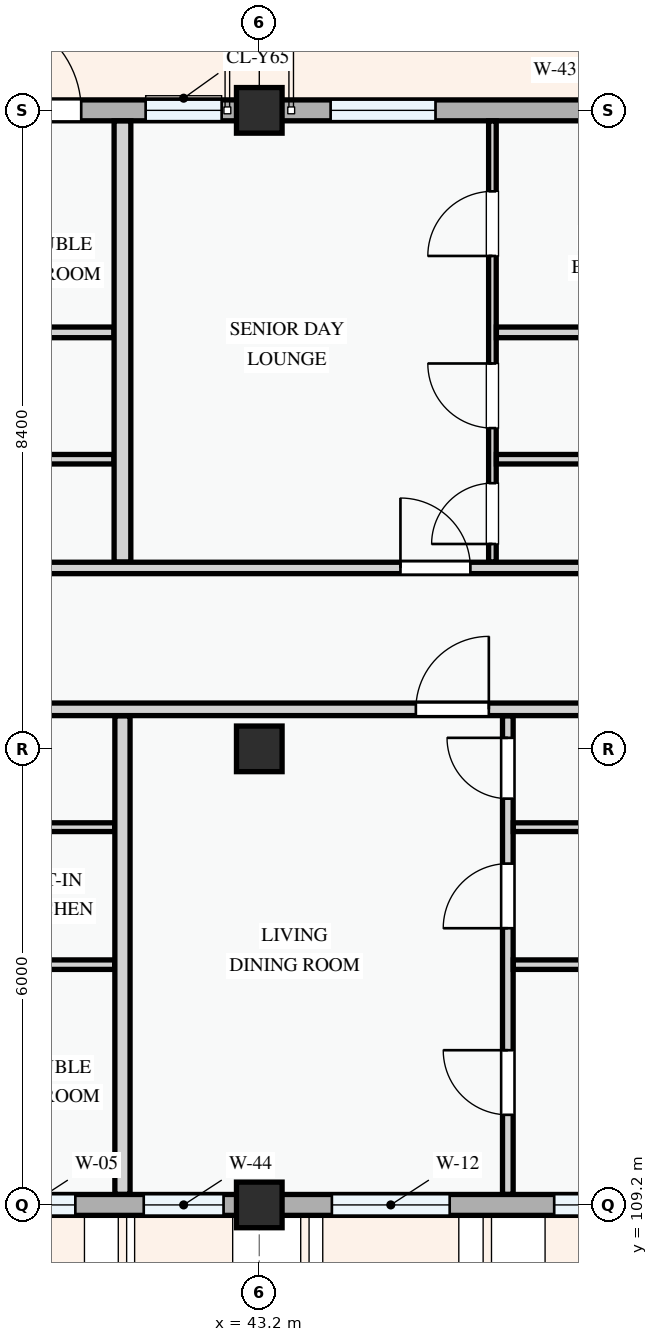
"""IFC4 building model, lengths in metres.
Left out: names, types, materials, properties, quantities, classifications, styles, units other than length and angle.
Written with IfcOpenShell. Run it as: python <this file> out.ifc"""

import sys

from ifc_helpers import new_model, si_unit, direction, frame, frame_2d, origin, origin_2d, place, context, subcontext, project, spatial, rectangle, extrude, element, fill, save


model = new_model("IFC4")
c1 = context("Model", 3, precision=1e-05, world=origin(), true_north=direction((0.0, 1.0)))
c2 = subcontext(c1, "Body", "Model", "MODEL_VIEW")
j1 = project(units=[si_unit("LENGTHUNIT", "METRE"), si_unit("PLANEANGLEUNIT", "RADIAN")], contexts=[c1])
p1 = place(None, origin())
s1 = spatial("IfcSite", under=j1, at=p1, CompositionType="ELEMENT")
p2 = place(p1, origin())
s2 = spatial("IfcBuilding", under=s1, at=p2, CompositionType="ELEMENT")
p3 = place(p2, frame((0.0, 0.0, 31.2)))
s3 = spatial("IfcBuildingStorey", under=s2, at=p3, CompositionType="ELEMENT", Elevation=31.2)
for number, where, z_axis, x_axis in (
    (1, (43.2, 109.2, 0.0), (0.0, 0.0, 1.0), (1.0, 0.0, 0.0)),
    (2, (43.2, 115.2, 0.0), (0.0, 0.0, 1.0), (1.0, 0.0, 0.0)),
    (3, (43.2, 123.6, 0.0), (0.0, 0.0, 1.0), (1.0, 0.0, 0.0)),
):
    element("IfcColumn", number, at=place(p3, frame(where, z_axis=z_axis, x_axis=x_axis)), inside=s3, PredefinedType="COLUMN", context=c2, shape_type="SweptSolid", body=[
        extrude(rectangle(XDim=0.6, YDim=0.6, at=origin_2d()), origin(), (0.0, 0.0, 1.0), 3.3),
    ])
p4 = place(p3, frame((37.2, 109.2, 0.0), z_axis=(0.0, 0.0, 1.0), x_axis=(1.0, 0.0, 0.0)))
e4 = element("IfcWall", 4, at=p4, inside=s3, PredefinedType="STANDARD", context=c2, shape_type="SweptSolid", body=[
    extrude(rectangle(XDim=6.0, YDim=0.275, at=frame_2d((3.0, 0.0))), origin(), (0.0, 0.0, 1.0), 2.525),
])
p5 = place(p4, frame((0.525, 0.0, 0.78)))
e5 = element("IfcOpeningElement", 5, at=p5, cuts=e4, PredefinedType="OPENING", context=c2, shape_type="SweptSolid", body=[
    extrude(rectangle(XDim=0.9, YDim=1.2, at=frame_2d((0.45, 0.6))), frame((0.0, 0.147, 0.0), z_axis=(0.0, -1.0, 0.0), x_axis=(1.0, 0.0, 0.0)), (0.0, 0.0, 1.0), 0.295),
])
p6 = place(p4, frame((2.38, 0.0, 0.78)))
e6 = element("IfcOpeningElement", 6, at=p6, cuts=e4, PredefinedType="OPENING", context=c2, shape_type="SweptSolid", body=[
    extrude(rectangle(XDim=1.2, YDim=1.5, at=frame_2d((0.6, 0.75))), frame((0.0, 0.147, 0.0), z_axis=(0.0, -1.0, 0.0), x_axis=(1.0, 0.0, 0.0)), (0.0, 0.0, 1.0), 0.295),
])
p7 = place(p4, frame((4.48, 0.0, 0.78)))
e7 = element("IfcOpeningElement", 7, at=p7, cuts=e4, PredefinedType="OPENING", context=c2, shape_type="SweptSolid", body=[
    extrude(rectangle(XDim=1.05, YDim=1.2, at=frame_2d((0.525, 0.6))), frame((0.0, 0.147, 0.0), z_axis=(0.0, -1.0, 0.0), x_axis=(1.0, 0.0, 0.0)), (0.0, 0.0, 1.0), 0.295),
])
p8 = place(p3, frame((43.2, 109.2, 0.0), z_axis=(0.0, 0.0, 1.0), x_axis=(1.0, 0.0, 0.0)))
e8 = element("IfcWall", 8, at=p8, inside=s3, PredefinedType="STANDARD", context=c2, shape_type="SweptSolid", body=[
    extrude(rectangle(XDim=8.4, YDim=0.275, at=frame_2d((4.2, 0.0))), origin(), (0.0, 0.0, 1.0), 2.375),
])
p9 = place(p8, frame((0.955, 0.0, 0.78)))
e9 = element("IfcOpeningElement", 9, at=p9, cuts=e8, PredefinedType="OPENING", context=c2, shape_type="SweptSolid", body=[
    extrude(rectangle(XDim=1.55, YDim=1.4, at=frame_2d((0.775, 0.7))), frame((0.0, 0.147, 0.0), z_axis=(0.0, -1.0, 0.0), x_axis=(1.0, 0.0, 0.0)), (0.0, 0.0, 1.0), 0.295),
])
p10 = place(p8, frame((3.88, 0.0, 0.78)))
e10 = element("IfcOpeningElement", 10, at=p10, cuts=e8, PredefinedType="OPENING", context=c2, shape_type="SweptSolid", body=[
    extrude(rectangle(XDim=1.32, YDim=1.35, at=frame_2d((0.66, 0.675))), frame((0.0, 0.147, 0.0), z_axis=(0.0, -1.0, 0.0), x_axis=(1.0, 0.0, 0.0)), (0.0, 0.0, 1.0), 0.295),
])
p11 = place(p8, frame((6.05, 0.0, 0.78)))
e11 = element("IfcOpeningElement", 11, at=p11, cuts=e8, PredefinedType="OPENING", context=c2, shape_type="SweptSolid", body=[
    extrude(rectangle(XDim=1.78, YDim=1.42, at=frame_2d((0.89, 0.71))), frame((0.0, 0.147, 0.0), z_axis=(0.0, -1.0, 0.0), x_axis=(1.0, 0.0, 0.0)), (0.0, 0.0, 1.0), 0.295),
])
p12 = place(p3, frame((51.6, 123.6, 0.0), z_axis=(0.0, 0.0, 1.0), x_axis=(-1.0, 0.0, 0.0)))
e12 = element("IfcWall", 12, at=p12, inside=s3, PredefinedType="STANDARD", context=c2, shape_type="SweptSolid", body=[
    extrude(rectangle(XDim=8.4, YDim=0.275, at=frame_2d((4.2, 0.0))), origin(), (0.0, 0.0, 1.0), 2.375),
])
p13 = place(p12, frame((0.62, 0.0, 0.0)))
e13 = element("IfcOpeningElement", 13, at=p13, cuts=e12, PredefinedType="OPENING", context=c2, shape_type="SweptSolid", body=[
    extrude(rectangle(XDim=1.25, YDim=2.2, at=frame_2d((0.625, 1.1))), frame((0.0, 0.147, 0.0), z_axis=(0.0, -1.0, 0.0), x_axis=(1.0, 0.0, 0.0)), (0.0, 0.0, 1.0), 0.295),
])
p14 = place(p12, frame((3.151, 0.0, 0.78)))
e14 = element("IfcOpeningElement", 14, at=p14, cuts=e12, PredefinedType="OPENING", context=c2, shape_type="SweptSolid", body=[
    extrude(rectangle(XDim=0.95, YDim=1.15, at=frame_2d((0.475, 0.575))), frame((0.0, 0.147, 0.0), z_axis=(0.0, -1.0, 0.0), x_axis=(1.0, 0.0, 0.0)), (0.0, 0.0, 1.0), 0.295),
])
p15 = place(p12, frame((6.081, 0.0, 0.78)))
e15 = element("IfcOpeningElement", 15, at=p15, cuts=e12, PredefinedType="OPENING", context=c2, shape_type="SweptSolid", body=[
    extrude(rectangle(XDim=1.38, YDim=1.48, at=frame_2d((0.69, 0.74))), frame((0.0, 0.147, 0.0), z_axis=(0.0, -1.0, 0.0), x_axis=(1.0, 0.0, 0.0)), (0.0, 0.0, 1.0), 0.295),
])
p16 = place(p3, frame((43.2, 123.6, 0.0), z_axis=(0.0, 0.0, 1.0), x_axis=(-1.0, 0.0, 0.0)))
e16 = element("IfcWall", 16, at=p16, inside=s3, PredefinedType="STANDARD", context=c2, shape_type="SweptSolid", body=[
    extrude(rectangle(XDim=6.0, YDim=0.275, at=frame_2d((3.0, 0.0))), origin(), (0.0, 0.0, 1.0), 2.525),
])
p17 = place(p16, frame((2.343, 0.0, 0.0)))
e17 = element("IfcOpeningElement", 17, at=p17, cuts=e16, PredefinedType="OPENING", context=c2, shape_type="SweptSolid", body=[
    extrude(rectangle(XDim=1.3, YDim=2.15, at=frame_2d((0.65, 1.075))), frame((0.0, 0.147, 0.0), z_axis=(0.0, -1.0, 0.0), x_axis=(1.0, 0.0, 0.0)), (0.0, 0.0, 1.0), 0.295),
])
p18 = place(p16, frame((0.495, 0.0, 0.78)))
e18 = element("IfcOpeningElement", 18, at=p18, cuts=e16, PredefinedType="OPENING", context=c2, shape_type="SweptSolid", body=[
    extrude(rectangle(XDim=1.0, YDim=1.25, at=frame_2d((0.5, 0.625))), frame((0.0, 0.147, 0.0), z_axis=(0.0, -1.0, 0.0), x_axis=(1.0, 0.0, 0.0)), (0.0, 0.0, 1.0), 0.295),
])
p19 = place(p16, frame((4.473, 0.0, 0.78)))
e19 = element("IfcOpeningElement", 19, at=p19, cuts=e16, PredefinedType="OPENING", context=c2, shape_type="SweptSolid", body=[
    extrude(rectangle(XDim=1.05, YDim=1.2, at=frame_2d((0.525, 0.6))), frame((0.0, 0.147, 0.0), z_axis=(0.0, -1.0, 0.0), x_axis=(1.0, 0.0, 0.0)), (0.0, 0.0, 1.0), 0.295),
])
p20 = place(p3, frame((39.032, 112.361, 0.0), z_axis=(0.0, 0.0, 1.0), x_axis=(1.0, 0.0, 0.0)))
e20 = element("IfcWall", 20, at=p20, inside=s3, PredefinedType="PARTITIONING", context=c2, shape_type="SweptSolid", body=[
    extrude(rectangle(XDim=2.266, YDim=0.125, at=frame_2d((1.133, 0.0))), origin(), (0.0, 0.0, 1.0), 3.0),
])
p21 = place(p3, frame((39.032, 114.17, 0.0), z_axis=(0.0, 0.0, 1.0), x_axis=(1.0, 0.0, 0.0)))
e21 = element("IfcWall", 21, at=p21, inside=s3, PredefinedType="PARTITIONING", context=c2, shape_type="SweptSolid", body=[
    extrude(rectangle(XDim=2.266, YDim=0.115, at=frame_2d((1.133, 0.0))), origin(), (0.0, 0.0, 1.0), 3.0),
])
p22 = place(p3, frame((39.066, 120.679, 0.0), z_axis=(0.0, 0.0, 1.0), x_axis=(1.0, 0.0, 0.0)))
e22 = element("IfcWall", 22, at=p22, inside=s3, PredefinedType="PARTITIONING", context=c2, shape_type="SweptSolid", body=[
    extrude(rectangle(XDim=2.222, YDim=0.14, at=frame_2d((1.111, 0.0))), origin(), (0.0, 0.0, 1.0), 3.0),
])
p23 = place(p3, frame((39.066, 119.01, 0.0), z_axis=(0.0, 0.0, 1.0), x_axis=(1.0, 0.0, 0.0)))
e23 = element("IfcWall", 23, at=p23, inside=s3, PredefinedType="PARTITIONING", context=c2, shape_type="SweptSolid", body=[
    extrude(rectangle(XDim=2.222, YDim=0.125, at=frame_2d((1.111, 0.0))), origin(), (0.0, 0.0, 1.0), 3.0),
])
p24 = place(p3, frame((46.47, 109.34, 0.0), z_axis=(0.0, 0.0, 1.0), x_axis=(0.0, 1.0, 0.0)))
e24 = element("IfcWall", 24, at=p24, inside=s3, PredefinedType="PARTITIONING", context=c2, shape_type="SweptSolid", body=[
    extrude(rectangle(XDim=6.296, YDim=0.14, at=frame_2d((3.148, 0.0))), origin(), (0.0, 0.0, 1.0), 3.0),
])
p25 = place(p24, frame((1.046, 0.0, 0.0)))
e25 = element("IfcOpeningElement", 25, at=p25, cuts=e24, PredefinedType="OPENING", context=c2, shape_type="SweptSolid", body=[
    extrude(rectangle(XDim=0.85, YDim=2.1, at=frame_2d((0.425, 1.05))), frame((0.0, 0.08, 0.0), z_axis=(0.0, -1.0, 0.0), x_axis=(1.0, 0.0, 0.0)), (0.0, 0.0, 1.0), 0.16),
])
p26 = place(p24, frame((3.501, 0.0, 0.0)))
e26 = element("IfcOpeningElement", 26, at=p26, cuts=e24, PredefinedType="OPENING", context=c2, shape_type="SweptSolid", body=[
    extrude(rectangle(XDim=0.85, YDim=2.1, at=frame_2d((0.425, 1.05))), frame((0.0, 0.08, 0.0), z_axis=(0.0, -1.0, 0.0), x_axis=(1.0, 0.0, 0.0)), (0.0, 0.0, 1.0), 0.16),
])
p27 = place(p24, frame((5.205, 0.0, 0.0)))
e27 = element("IfcOpeningElement", 27, at=p27, cuts=e24, PredefinedType="OPENING", context=c2, shape_type="SweptSolid", body=[
    extrude(rectangle(XDim=0.8, YDim=2.1, at=frame_2d((0.4, 1.05))), frame((0.0, 0.08, 0.0), z_axis=(0.0, -1.0, 0.0), x_axis=(1.0, 0.0, 0.0)), (0.0, 0.0, 1.0), 0.16),
])
p28 = place(p3, frame((46.542, 112.361, 0.0), z_axis=(0.0, 0.0, 1.0), x_axis=(1.0, 0.0, 0.0)))
e28 = element("IfcWall", 28, at=p28, inside=s3, PredefinedType="PARTITIONING", context=c2, shape_type="SweptSolid", body=[
    extrude(rectangle(XDim=4.918, YDim=0.125, at=frame_2d((2.459, 0.0))), origin(), (0.0, 0.0, 1.0), 3.0),
])
p29 = place(p3, frame((46.542, 114.17, 0.0), z_axis=(0.0, 0.0, 1.0), x_axis=(1.0, 0.0, 0.0)))
e29 = element("IfcWall", 29, at=p29, inside=s3, PredefinedType="PARTITIONING", context=c2, shape_type="SweptSolid", body=[
    extrude(rectangle(XDim=4.918, YDim=0.115, at=frame_2d((2.459, 0.0))), origin(), (0.0, 0.0, 1.0), 3.0),
])
p30 = place(p3, frame((46.267, 117.657, 0.0), z_axis=(0.0, 0.0, 1.0), x_axis=(0.0, 1.0, 0.0)))
e30 = element("IfcWall", 30, at=p30, inside=s3, PredefinedType="PARTITIONING", context=c2, shape_type="SweptSolid", body=[
    extrude(rectangle(XDim=5.803, YDim=0.1, at=frame_2d((2.902, 0.0))), origin(), (0.0, 0.0, 1.0), 3.0),
])
p31 = place(p30, frame((0.238, 0.0, 0.0)))
e31 = element("IfcOpeningElement", 31, at=p31, cuts=e30, PredefinedType="OPENING", context=c2, shape_type="SweptSolid", body=[
    extrude(rectangle(XDim=0.8, YDim=2.1, at=frame_2d((0.4, 1.05))), frame((0.0, 0.06, 0.0), z_axis=(0.0, -1.0, 0.0), x_axis=(1.0, 0.0, 0.0)), (0.0, 0.0, 1.0), 0.12),
])
p32 = place(p30, frame((1.763, 0.0, 0.0)))
e32 = element("IfcOpeningElement", 32, at=p32, cuts=e30, PredefinedType="OPENING", context=c2, shape_type="SweptSolid", body=[
    extrude(rectangle(XDim=0.85, YDim=2.1, at=frame_2d((0.425, 1.05))), frame((0.0, 0.06, 0.0), z_axis=(0.0, -1.0, 0.0), x_axis=(1.0, 0.0, 0.0)), (0.0, 0.0, 1.0), 0.12),
])
p33 = place(p30, frame((4.028, 0.0, 0.0)))
e33 = element("IfcOpeningElement", 33, at=p33, cuts=e30, PredefinedType="OPENING", context=c2, shape_type="SweptSolid", body=[
    extrude(rectangle(XDim=0.85, YDim=2.1, at=frame_2d((0.425, 1.05))), frame((0.0, 0.06, 0.0), z_axis=(0.0, -1.0, 0.0), x_axis=(1.0, 0.0, 0.0)), (0.0, 0.0, 1.0), 0.12),
])
p34 = place(p3, frame((46.319, 120.679, 0.0), z_axis=(0.0, 0.0, 1.0), x_axis=(1.0, 0.0, 0.0)))
e34 = element("IfcWall", 34, at=p34, inside=s3, PredefinedType="PARTITIONING", context=c2, shape_type="SweptSolid", body=[
    extrude(rectangle(XDim=5.221, YDim=0.14, at=frame_2d((2.61, 0.0))), origin(), (0.0, 0.0, 1.0), 3.0),
])
p35 = place(p3, frame((46.319, 119.01, 0.0), z_axis=(0.0, 0.0, 1.0), x_axis=(1.0, 0.0, 0.0)))
e35 = element("IfcWall", 35, at=p35, inside=s3, PredefinedType="PARTITIONING", context=c2, shape_type="SweptSolid", body=[
    extrude(rectangle(XDim=5.221, YDim=0.125, at=frame_2d((2.61, 0.0))), origin(), (0.0, 0.0, 1.0), 3.0),
])
p36 = place(p3, frame((41.4, 109.34, 0.0), z_axis=(0.0, 0.0, 1.0), x_axis=(0.0, 1.0, 0.0)))
e36 = element("IfcWall", 36, at=p36, inside=s3, PredefinedType="PARTITIONING", context=c2, shape_type="SweptSolid", body=[
    extrude(rectangle(XDim=6.296, YDim=0.2, at=frame_2d((3.148, 0.0))), origin(), (0.0, 0.0, 1.0), 3.0),
])
p37 = place(p3, frame((41.4, 117.657, 0.0), z_axis=(0.0, 0.0, 1.0), x_axis=(0.0, 1.0, 0.0)))
e37 = element("IfcWall", 37, at=p37, inside=s3, PredefinedType="PARTITIONING", context=c2, shape_type="SweptSolid", body=[
    extrude(rectangle(XDim=5.803, YDim=0.22, at=frame_2d((2.902, 0.0))), origin(), (0.0, 0.0, 1.0), 3.0),
])
p38 = place(p3, frame((25.15, 115.72, 0.0), z_axis=(0.0, 0.0, 1.0), x_axis=(1.0, 0.0, 0.0)))
e38 = element("IfcWall", 38, at=p38, inside=s3, PredefinedType="PARTITIONING", context=c2, shape_type="SweptSolid", body=[
    extrude(rectangle(XDim=26.311, YDim=0.165, at=frame_2d((13.155, 0.0))), origin(), (0.0, 0.0, 1.0), 3.0),
])
p39 = place(p38, frame((0.25, 0.0, 0.0)))
e39 = element("IfcOpeningElement", 39, at=p39, cuts=e38, PredefinedType="OPENING", context=c2, shape_type="SweptSolid", body=[
    extrude(rectangle(XDim=0.92, YDim=2.1, at=frame_2d((0.46, 1.05))), frame((0.0, 0.093, 0.0), z_axis=(0.0, -1.0, 0.0), x_axis=(1.0, 0.0, 0.0)), (0.0, 0.0, 1.0), 0.185),
])
p40 = place(p38, frame((9.22, 0.0, 0.0)))
e40 = element("IfcOpeningElement", 40, at=p40, cuts=e38, PredefinedType="OPENING", context=c2, shape_type="SweptSolid", body=[
    extrude(rectangle(XDim=0.92, YDim=2.1, at=frame_2d((0.46, 1.05))), frame((0.0, 0.093, 0.0), z_axis=(0.0, -1.0, 0.0), x_axis=(1.0, 0.0, 0.0)), (0.0, 0.0, 1.0), 0.185),
])
p41 = place(p38, frame((20.11, 0.0, 0.0)))
e41 = element("IfcOpeningElement", 41, at=p41, cuts=e38, PredefinedType="OPENING", context=c2, shape_type="SweptSolid", body=[
    extrude(rectangle(XDim=0.96, YDim=2.12, at=frame_2d((0.48, 1.06))), frame((0.0, 0.093, 0.0), z_axis=(0.0, -1.0, 0.0), x_axis=(1.0, 0.0, 0.0)), (0.0, 0.0, 1.0), 0.185),
])
p42 = place(p3, frame((22.66, 117.58, 0.0), z_axis=(0.0, 0.0, 1.0), x_axis=(1.0, 0.0, 0.0)))
e42 = element("IfcWall", 42, at=p42, inside=s3, PredefinedType="PARTITIONING", context=c2, shape_type="SweptSolid", body=[
    extrude(rectangle(XDim=28.88, YDim=0.15, at=frame_2d((14.44, 0.0))), origin(), (0.0, 0.0, 1.0), 3.0),
])
p43 = place(p42, frame((2.74, 0.0, 0.0)))
e43 = element("IfcOpeningElement", 43, at=p43, cuts=e42, PredefinedType="OPENING", context=c2, shape_type="SweptSolid", body=[
    extrude(rectangle(XDim=0.92, YDim=2.1, at=frame_2d((0.46, 1.05))), frame((0.0, 0.085, 0.0), z_axis=(0.0, -1.0, 0.0), x_axis=(1.0, 0.0, 0.0)), (0.0, 0.0, 1.0), 0.17),
])
p44 = place(p42, frame((11.71, 0.0, 0.0)))
e44 = element("IfcOpeningElement", 44, at=p44, cuts=e42, PredefinedType="OPENING", context=c2, shape_type="SweptSolid", body=[
    extrude(rectangle(XDim=0.92, YDim=2.1, at=frame_2d((0.46, 1.05))), frame((0.0, 0.085, 0.0), z_axis=(0.0, -1.0, 0.0), x_axis=(1.0, 0.0, 0.0)), (0.0, 0.0, 1.0), 0.17),
])
p45 = place(p42, frame((22.397, 0.0, 0.0)))
e45 = element("IfcOpeningElement", 45, at=p45, cuts=e42, PredefinedType="OPENING", context=c2, shape_type="SweptSolid", body=[
    extrude(rectangle(XDim=0.92, YDim=2.1, at=frame_2d((0.46, 1.05))), frame((0.0, 0.085, 0.0), z_axis=(0.0, -1.0, 0.0), x_axis=(1.0, 0.0, 0.0)), (0.0, 0.0, 1.0), 0.17),
])
p46 = place(p6, origin())
e46 = element("IfcWindow", 46, at=p46, inside=s3, PartitioningType="SINGLE_PANEL", PredefinedType="WINDOW", context=c2, shape_type="SweptSolid", body=[
    extrude(rectangle(XDim=1.2, YDim=1.5, at=frame_2d((0.6, 0.75))), frame((0.0, 0.03, 0.0), z_axis=(0.0, -1.0, 0.0), x_axis=(1.0, 0.0, 0.0)), (0.0, 0.0, 1.0), 0.06),
])
fill(e6, e46)
p47 = place(p7, origin())
e47 = element("IfcWindow", 47, at=p47, inside=s3, PartitioningType="SINGLE_PANEL", PredefinedType="WINDOW", context=c2, shape_type="SweptSolid", body=[
    extrude(rectangle(XDim=1.05, YDim=1.2, at=frame_2d((0.525, 0.6))), frame((0.0, 0.03, 0.0), z_axis=(0.0, -1.0, 0.0), x_axis=(1.0, 0.0, 0.0)), (0.0, 0.0, 1.0), 0.06),
])
fill(e7, e47)
p48 = place(p9, origin())
e48 = element("IfcWindow", 48, at=p48, inside=s3, PartitioningType="SINGLE_PANEL", PredefinedType="WINDOW", context=c2, shape_type="SweptSolid", body=[
    extrude(rectangle(XDim=1.55, YDim=1.4, at=frame_2d((0.775, 0.7))), frame((0.0, 0.03, 0.0), z_axis=(0.0, -1.0, 0.0), x_axis=(1.0, 0.0, 0.0)), (0.0, 0.0, 1.0), 0.06),
])
fill(e9, e48)
p49 = place(p10, origin())
e49 = element("IfcWindow", 49, at=p49, inside=s3, PartitioningType="SINGLE_PANEL", PredefinedType="WINDOW", context=c2, shape_type="SweptSolid", body=[
    extrude(rectangle(XDim=1.32, YDim=1.35, at=frame_2d((0.66, 0.675))), frame((0.0, 0.03, 0.0), z_axis=(0.0, -1.0, 0.0), x_axis=(1.0, 0.0, 0.0)), (0.0, 0.0, 1.0), 0.06),
])
fill(e10, e49)
p50 = place(p15, origin())
e50 = element("IfcWindow", 50, at=p50, inside=s3, PartitioningType="SINGLE_PANEL", PredefinedType="WINDOW", context=c2, shape_type="SweptSolid", body=[
    extrude(rectangle(XDim=1.38, YDim=1.48, at=frame_2d((0.69, 0.74))), frame((0.0, 0.03, 0.0), z_axis=(0.0, -1.0, 0.0), x_axis=(1.0, 0.0, 0.0)), (0.0, 0.0, 1.0), 0.06),
])
fill(e15, e50)
p51 = place(p17, frame((1.3, 0.0, 0.0), z_axis=(0.0, 0.0, 1.0), x_axis=(-1.0, 0.0, 0.0)))
e51 = element("IfcDoor", 51, at=p51, inside=s3, OperationType="SINGLE_SWING_LEFT", PredefinedType="DOOR", context=c2, shape_type="SweptSolid", body=[
    extrude(rectangle(XDim=1.3, YDim=2.15, at=frame_2d((0.65, 1.075))), frame((0.0, 0.025, 0.0), z_axis=(0.0, -1.0, 0.0), x_axis=(1.0, 0.0, 0.0)), (0.0, 0.0, 1.0), 0.05),
])
fill(e17, e51)
p52 = place(p18, origin())
e52 = element("IfcWindow", 52, at=p52, inside=s3, PartitioningType="SINGLE_PANEL", PredefinedType="WINDOW", context=c2, shape_type="SweptSolid", body=[
    extrude(rectangle(XDim=1.0, YDim=1.25, at=frame_2d((0.5, 0.625))), frame((0.0, 0.03, 0.0), z_axis=(0.0, -1.0, 0.0), x_axis=(1.0, 0.0, 0.0)), (0.0, 0.0, 1.0), 0.06),
])
fill(e18, e52)
p53 = place(p25, origin())
e53 = element("IfcDoor", 53, at=p53, inside=s3, OperationType="SINGLE_SWING_RIGHT", PredefinedType="DOOR", context=c2, shape_type="SweptSolid", body=[
    extrude(rectangle(XDim=0.85, YDim=2.1, at=frame_2d((0.425, 1.05))), frame((0.0, 0.025, 0.0), z_axis=(0.0, -1.0, 0.0), x_axis=(1.0, 0.0, 0.0)), (0.0, 0.0, 1.0), 0.05),
])
fill(e25, e53)
p54 = place(p26, origin())
e54 = element("IfcDoor", 54, at=p54, inside=s3, OperationType="SINGLE_SWING_LEFT", PredefinedType="DOOR", context=c2, shape_type="SweptSolid", body=[
    extrude(rectangle(XDim=0.85, YDim=2.1, at=frame_2d((0.425, 1.05))), frame((0.0, 0.025, 0.0), z_axis=(0.0, -1.0, 0.0), x_axis=(1.0, 0.0, 0.0)), (0.0, 0.0, 1.0), 0.05),
])
fill(e26, e54)
p55 = place(p27, origin())
e55 = element("IfcDoor", 55, at=p55, inside=s3, OperationType="SINGLE_SWING_RIGHT", PredefinedType="DOOR", context=c2, shape_type="SweptSolid", body=[
    extrude(rectangle(XDim=0.8, YDim=2.1, at=frame_2d((0.4, 1.05))), frame((0.0, 0.025, 0.0), z_axis=(0.0, -1.0, 0.0), x_axis=(1.0, 0.0, 0.0)), (0.0, 0.0, 1.0), 0.05),
])
fill(e27, e55)
p56 = place(p31, origin())
e56 = element("IfcDoor", 56, at=p56, inside=s3, OperationType="SINGLE_SWING_LEFT", PredefinedType="DOOR", context=c2, shape_type="SweptSolid", body=[
    extrude(rectangle(XDim=0.8, YDim=2.1, at=frame_2d((0.4, 1.05))), frame((0.0, 0.025, 0.0), z_axis=(0.0, -1.0, 0.0), x_axis=(1.0, 0.0, 0.0)), (0.0, 0.0, 1.0), 0.05),
])
fill(e31, e56)
p57 = place(p32, origin())
e57 = element("IfcDoor", 57, at=p57, inside=s3, OperationType="SINGLE_SWING_RIGHT", PredefinedType="DOOR", context=c2, shape_type="SweptSolid", body=[
    extrude(rectangle(XDim=0.85, YDim=2.1, at=frame_2d((0.425, 1.05))), frame((0.0, 0.025, 0.0), z_axis=(0.0, -1.0, 0.0), x_axis=(1.0, 0.0, 0.0)), (0.0, 0.0, 1.0), 0.05),
])
fill(e32, e57)
p58 = place(p33, origin())
e58 = element("IfcDoor", 58, at=p58, inside=s3, OperationType="SINGLE_SWING_LEFT", PredefinedType="DOOR", context=c2, shape_type="SweptSolid", body=[
    extrude(rectangle(XDim=0.85, YDim=2.1, at=frame_2d((0.425, 1.05))), frame((0.0, 0.025, 0.0), z_axis=(0.0, -1.0, 0.0), x_axis=(1.0, 0.0, 0.0)), (0.0, 0.0, 1.0), 0.05),
])
fill(e33, e58)
p59 = place(p41, origin())
e59 = element("IfcDoor", 59, at=p59, inside=s3, OperationType="SINGLE_SWING_RIGHT", PredefinedType="DOOR", context=c2, shape_type="SweptSolid", body=[
    extrude(rectangle(XDim=0.96, YDim=2.12, at=frame_2d((0.48, 1.06))), frame((0.0, 0.025, 0.0), z_axis=(0.0, -1.0, 0.0), x_axis=(1.0, 0.0, 0.0)), (0.0, 0.0, 1.0), 0.05),
])
fill(e41, e59)
p60 = place(p45, origin())
e60 = element("IfcDoor", 60, at=p60, inside=s3, OperationType="SINGLE_SWING_LEFT", PredefinedType="DOOR", context=c2, shape_type="SweptSolid", body=[
    extrude(rectangle(XDim=0.92, YDim=2.1, at=frame_2d((0.46, 1.05))), frame((0.0, 0.025, 0.0), z_axis=(0.0, -1.0, 0.0), x_axis=(1.0, 0.0, 0.0)), (0.0, 0.0, 1.0), 0.05),
])
fill(e45, e60)
save(model, sys.argv[1])
